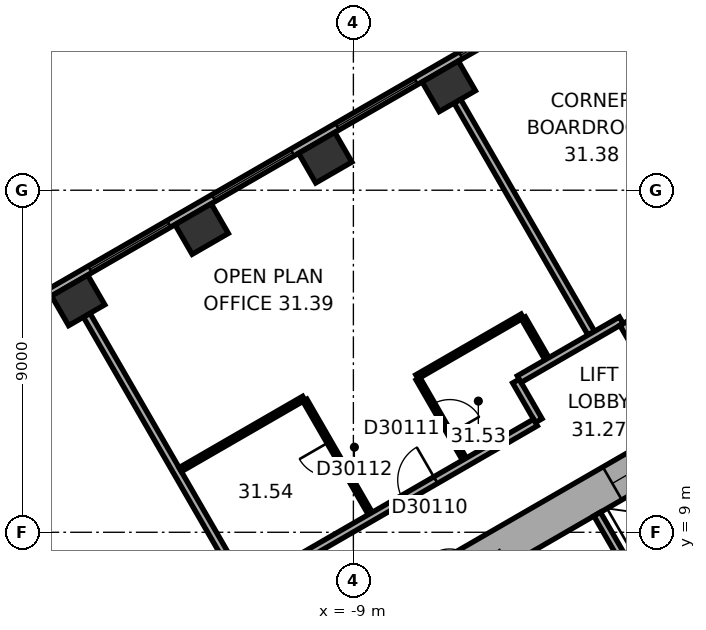
"""IFC4 building model, lengths in metres.
Left out: names, types, materials, properties, quantities, classifications, styles, units other than length and angle.
Written with IfcOpenShell. Run it as: python <this file> out.ifc"""

import sys

from ifc_helpers import new_model, si_unit, direction, frame, frame_2d, origin, origin_2d, place, context, subcontext, project, spatial, rectangle, extrude, element, fill, save


model = new_model("IFC4")
c1 = context("Model", 3, precision=1e-05, world=origin(), true_north=direction((0.0, 1.0)))
c2 = subcontext(c1, "Body", "Model", "MODEL_VIEW")
j1 = project(units=[si_unit("LENGTHUNIT", "METRE"), si_unit("PLANEANGLEUNIT", "RADIAN")], contexts=[c1])
p1 = place(None, origin())
s1 = spatial("IfcSite", under=j1, at=p1, CompositionType="ELEMENT")
p2 = place(p1, origin())
s2 = spatial("IfcBuilding", under=s1, at=p2, CompositionType="ELEMENT")
p3 = place(p2, frame((0.0, 0.0, 128.1)))
s3 = spatial("IfcBuildingStorey", under=s2, at=p3, CompositionType="ELEMENT", Elevation=128.1)
for number, where, z_axis, x_axis in (
    (1, (-6.489, 20.733, 0.0), (0.0, 0.0, 1.0), (-0.866, -0.5, 0.0)),
    (2, (-9.74, 18.856, 0.0), (0.0, 0.0, 1.0), (-0.866, -0.5, 0.0)),
    (3, (-12.991, 16.979, 0.0), (0.0, 0.0, 1.0), (-0.866, -0.5, 0.0)),
    (4, (-16.242, 15.102, 0.0), (0.0, 0.0, 1.0), (-0.866, -0.5, 0.0)),
):
    element("IfcColumn", number, at=place(p3, frame(where, z_axis=z_axis, x_axis=x_axis)), inside=s3, PredefinedType="COLUMN", context=c2, shape_type="SweptSolid", body=[
        extrude(rectangle(XDim=1.1, YDim=0.9, at=origin_2d()), origin(), (0.0, 0.0, 1.0), 3.7),
    ])
p4 = place(p3, frame((0.25, 11.691, 0.0), z_axis=(0.0, 0.0, 1.0), x_axis=(-0.866022616891, -0.50000482701, 0.0)))
e5 = element("IfcWall", 5, at=p4, inside=s3, PredefinedType="SHEAR", context=c2, shape_type="SweptSolid", body=[
    extrude(rectangle(XDim=12.125, YDim=1.0, at=frame_2d((6.062, 0.0))), origin(), (0.0, 0.0, 1.0), 3.7),
])
p5 = place(p4, frame((6.262, 0.0, 0.0)))
e6 = element("IfcOpeningElement", 6, at=p5, cuts=e5, PredefinedType="OPENING", context=c2, shape_type="SweptSolid", body=[
    extrude(rectangle(XDim=1.5, YDim=2.1, at=frame_2d((0.75, 1.05))), frame((0.0, 0.51, 0.0), z_axis=(0.0, -1.0, 0.0), x_axis=(1.0, 0.0, 0.0)), (0.0, 0.0, 1.0), 1.02),
])
p6 = place(p4, frame((1.712, 0.0, 0.0)))
e7 = element("IfcOpeningElement", 7, at=p6, cuts=e5, PredefinedType="OPENING", context=c2, shape_type="SweptSolid", body=[
    extrude(rectangle(XDim=1.1, YDim=2.1, at=frame_2d((0.55, 1.05))), frame((0.0, 0.51, 0.0), z_axis=(0.0, -1.0, 0.0), x_axis=(1.0, 0.0, 0.0)), (0.0, 0.0, 1.0), 1.02),
])
p7 = place(p3, frame((-2.961, 23.405, 0.0), z_axis=(0.0, 0.0, 1.0), x_axis=(-0.866023315909, -0.500003616288, 0.0)))
e8 = element("IfcWall", 8, at=p7, inside=s3, PredefinedType="STANDARD", context=c2, shape_type="SweptSolid", body=[
    extrude(rectangle(XDim=20.044, YDim=0.2, at=frame_2d((10.022, 0.0))), origin(), (0.0, 0.0, 1.0), 3.7),
])
p8 = place(p7, frame((1.314, 0.0, 0.9)))
e9 = element("IfcOpeningElement", 9, at=p8, cuts=e8, PredefinedType="OPENING", context=c2, shape_type="SweptSolid", body=[
    extrude(rectangle(XDim=2.4, YDim=2.0, at=frame_2d((1.2, 1.0))), frame((0.0, 0.11, 0.0), z_axis=(0.0, -1.0, 0.0), x_axis=(1.0, 0.0, 0.0)), (0.0, 0.0, 1.0), 0.22),
])
p9 = place(p7, frame((5.069, 0.0, 0.9)))
e10 = element("IfcOpeningElement", 10, at=p9, cuts=e8, PredefinedType="OPENING", context=c2, shape_type="SweptSolid", body=[
    extrude(rectangle(XDim=2.4, YDim=2.0, at=frame_2d((1.2, 1.0))), frame((0.0, 0.11, 0.0), z_axis=(0.0, -1.0, 0.0), x_axis=(1.0, 0.0, 0.0)), (0.0, 0.0, 1.0), 0.22),
])
p10 = place(p7, frame((8.823, 0.0, 0.9)))
e11 = element("IfcOpeningElement", 11, at=p10, cuts=e8, PredefinedType="OPENING", context=c2, shape_type="SweptSolid", body=[
    extrude(rectangle(XDim=2.4, YDim=2.0, at=frame_2d((1.2, 1.0))), frame((0.0, 0.11, 0.0), z_axis=(0.0, -1.0, 0.0), x_axis=(1.0, 0.0, 0.0)), (0.0, 0.0, 1.0), 0.22),
])
p11 = place(p7, frame((12.577, 0.0, 0.9)))
e12 = element("IfcOpeningElement", 12, at=p11, cuts=e8, PredefinedType="OPENING", context=c2, shape_type="SweptSolid", body=[
    extrude(rectangle(XDim=2.4, YDim=2.0, at=frame_2d((1.2, 1.0))), frame((0.0, 0.11, 0.0), z_axis=(0.0, -1.0, 0.0), x_axis=(1.0, 0.0, 0.0)), (0.0, 0.0, 1.0), 0.22),
])
p12 = place(p7, frame((16.331, 0.0, 0.9)))
e13 = element("IfcOpeningElement", 13, at=p12, cuts=e8, PredefinedType="OPENING", context=c2, shape_type="SweptSolid", body=[
    extrude(rectangle(XDim=2.4, YDim=2.0, at=frame_2d((1.2, 1.0))), frame((0.0, 0.11, 0.0), z_axis=(0.0, -1.0, 0.0), x_axis=(1.0, 0.0, 0.0)), (0.0, 0.0, 1.0), 0.22),
])
p13 = place(p3, frame((0.803, 9.009, 0.0), z_axis=(0.0, 0.0, 1.0), x_axis=(-0.866028230842, -0.499995103361, 0.0)))
e14 = element("IfcWall", 14, at=p13, inside=s3, PredefinedType="PARTITIONING", context=c2, shape_type="SweptSolid", body=[
    extrude(rectangle(XDim=5.4, YDim=0.2, at=frame_2d((2.7, 0.0))), origin(), (0.0, 0.0, 1.0), 3.42),
])
p14 = place(p3, frame((-1.485, 7.572, 0.0), z_axis=(0.0, 0.0, 1.0), x_axis=(-0.50002983664, 0.866008176907, 0.0)))
e15 = element("IfcWall", 15, at=p14, inside=s3, PredefinedType="PARTITIONING", context=c2, shape_type="SweptSolid", body=[
    extrude(rectangle(XDim=2.2, YDim=0.2, at=frame_2d((1.1, 0.0))), origin(), (0.0, 0.0, 1.0), 3.42),
])
p15 = place(p3, frame((-16.018, 14.712, 0.0), z_axis=(0.0, 0.0, 1.0), x_axis=(0.500000843414, -0.866024916838, 0.0)))
e16 = element("IfcWall", 16, at=p15, inside=s3, PredefinedType="PARTITIONING", context=c2, shape_type="SweptSolid", body=[
    extrude(rectangle(XDim=8.452, YDim=0.2, at=frame_2d((4.226, 0.0))), origin(), (0.0, 0.0, 1.0), 3.42),
])
p16 = place(p3, frame((-13.556, 10.649, 0.0), z_axis=(0.0, 0.0, 1.0), x_axis=(0.866020939036, 0.500007733091, 0.0)))
e17 = element("IfcWall", 17, at=p16, inside=s3, PredefinedType="PARTITIONING", context=c2, shape_type="SweptSolid", body=[
    extrude(rectangle(XDim=3.753, YDim=0.12, at=frame_2d((1.877, 0.0))), origin(), (0.0, 0.0, 1.0), 3.42),
])
p17 = place(p3, frame((-10.275, 12.473, 0.0), z_axis=(0.0, 0.0, 1.0), x_axis=(0.500009156386, -0.866020117278, 0.0)))
e18 = element("IfcWall", 18, at=p17, inside=s3, PredefinedType="PARTITIONING", context=c2, shape_type="SweptSolid", body=[
    extrude(rectangle(XDim=3.44, YDim=0.12, at=frame_2d((1.72, 0.0))), origin(), (0.0, 0.0, 1.0), 3.42),
])
p18 = place(p17, frame((1.27, 0.0, 0.0)))
e19 = element("IfcOpeningElement", 19, at=p18, cuts=e18, PredefinedType="OPENING", context=c2, shape_type="SweptSolid", body=[
    extrude(rectangle(XDim=0.9, YDim=2.1, at=frame_2d((0.45, 1.05))), frame((0.0, 0.07, 0.0), z_axis=(0.0, -1.0, 0.0), x_axis=(1.0, 0.0, 0.0)), (0.0, 0.0, 1.0), 0.14),
])
p19 = place(p3, frame((-7.328, 13.09, 0.0), z_axis=(0.0, 0.0, 1.0), x_axis=(0.866008981251, 0.500028443584, 0.0)))
e20 = element("IfcWall", 20, at=p19, inside=s3, PredefinedType="PARTITIONING", context=c2, shape_type="SweptSolid", body=[
    extrude(rectangle(XDim=3.2, YDim=0.12, at=frame_2d((1.6, 0.0))), origin(), (0.0, 0.0, 1.0), 3.42),
])
p20 = place(p3, frame((-6.264, 20.344, 0.0), z_axis=(0.0, 0.0, 1.0), x_axis=(0.500009260695, -0.866020057054, 0.0)))
e21 = element("IfcWall", 21, at=p20, inside=s3, PredefinedType="PARTITIONING", context=c2, shape_type="SweptSolid", body=[
    extrude(rectangle(XDim=7.049, YDim=0.2, at=frame_2d((3.524, 0.0))), origin(), (0.0, 0.0, 1.0), 3.42),
])
p21 = place(p3, frame((-6.078, 10.925, 0.0), z_axis=(0.0, 0.0, 1.0), x_axis=(-0.500002508028, 0.866023955769, 0.0)))
e22 = element("IfcWall", 22, at=p21, inside=s3, PredefinedType="PARTITIONING", context=c2, shape_type="SweptSolid", body=[
    extrude(rectangle(XDim=2.44, YDim=0.12, at=frame_2d((1.22, 0.0))), origin(), (0.0, 0.0, 1.0), 2.87),
])
p22 = place(p21, frame((0.77, 0.0, 0.0)))
e23 = element("IfcOpeningElement", 23, at=p22, cuts=e22, PredefinedType="OPENING", context=c2, shape_type="SweptSolid", body=[
    extrude(rectangle(XDim=0.9, YDim=2.1, at=frame_2d((0.45, 1.05))), frame((0.0, 0.07, 0.0), z_axis=(0.0, -1.0, 0.0), x_axis=(1.0, 0.0, 0.0)), (0.0, 0.0, 1.0), 0.14),
])
p23 = place(p3, frame((-4.723, 12.978, 0.0), z_axis=(0.0, 0.0, 1.0), x_axis=(0.500074377092, -0.865982457891, 0.0)))
e24 = element("IfcWall", 24, at=p23, inside=s3, PredefinedType="PARTITIONING", context=c2, shape_type="SweptSolid", body=[
    extrude(rectangle(XDim=1.201, YDim=0.2, at=frame_2d((0.601, 0.0))), origin(), (0.0, 0.0, 1.0), 3.42),
])
p24 = place(p3, frame((-4.526, 14.638, 0.0), z_axis=(0.0, 0.0, 1.0), x_axis=(0.499932836684, -0.86606417707, 0.0)))
e25 = element("IfcWall", 25, at=p24, inside=s3, PredefinedType="PARTITIONING", context=c2, shape_type="SweptSolid", body=[
    extrude(rectangle(XDim=1.239, YDim=0.12, at=frame_2d((0.62, 0.0))), origin(), (0.0, 0.0, 1.0), 3.42),
])
p25 = place(p3, frame((-4.209, 11.888, 0.0), z_axis=(0.0, 0.0, 1.0), x_axis=(-0.866020930448, -0.500007747966, 0.0)))
e26 = element("IfcWall", 26, at=p25, inside=s3, PredefinedType="PARTITIONING", context=c2, shape_type="SweptSolid", body=[
    extrude(rectangle(XDim=8.321, YDim=0.2, at=frame_2d((4.161, 0.0))), origin(), (0.0, 0.0, 1.0), 3.42),
])
p26 = place(p25, frame((3.031, 0.0, 0.0)))
e27 = element("IfcOpeningElement", 27, at=p26, cuts=e26, PredefinedType="OPENING", context=c2, shape_type="SweptSolid", body=[
    extrude(rectangle(XDim=1.0, YDim=2.1, at=frame_2d((0.5, 1.05))), frame((0.0, 0.11, 0.0), z_axis=(0.0, -1.0, 0.0), x_axis=(1.0, 0.0, 0.0)), (0.0, 0.0, 1.0), 0.22),
])
p27 = place(p3, frame((-1.95, 14.579, 0.0), z_axis=(0.0, 0.0, 1.0), x_axis=(-0.866011260204, -0.500024496599, 0.0)))
e28 = element("IfcWall", 28, at=p27, inside=s3, PredefinedType="PARTITIONING", context=c2, shape_type="SweptSolid", body=[
    extrude(rectangle(XDim=3.102, YDim=0.2, at=frame_2d((1.551, 0.0))), origin(), (0.0, 0.0, 1.0), 3.42),
])
p28 = place(p3, frame((-1.349, 13.539, 0.0), z_axis=(0.0, 0.0, 1.0), x_axis=(-0.500074377092, 0.865982457891, 0.0)))
e29 = element("IfcWall", 29, at=p28, inside=s3, PredefinedType="PARTITIONING", context=c2, shape_type="SweptSolid", body=[
    extrude(rectangle(XDim=1.101, YDim=0.2, at=frame_2d((0.55, 0.0))), origin(), (0.0, 0.0, 1.0), 3.42),
])
p29 = place(p8, origin())
e30 = element("IfcWindow", 30, at=p29, inside=s3, PartitioningType="SINGLE_PANEL", PredefinedType="WINDOW", context=c2, shape_type="SweptSolid", body=[
    extrude(rectangle(XDim=2.4, YDim=2.0, at=frame_2d((1.2, 1.0))), frame((0.0, 0.03, 0.0), z_axis=(0.0, -1.0, 0.0), x_axis=(1.0, 0.0, 0.0)), (0.0, 0.0, 1.0), 0.06),
])
fill(e9, e30)
p30 = place(p9, origin())
e31 = element("IfcWindow", 31, at=p30, inside=s3, PartitioningType="SINGLE_PANEL", PredefinedType="WINDOW", context=c2, shape_type="SweptSolid", body=[
    extrude(rectangle(XDim=2.4, YDim=2.0, at=frame_2d((1.2, 1.0))), frame((0.0, 0.03, 0.0), z_axis=(0.0, -1.0, 0.0), x_axis=(1.0, 0.0, 0.0)), (0.0, 0.0, 1.0), 0.06),
])
fill(e10, e31)
p31 = place(p10, origin())
e32 = element("IfcWindow", 32, at=p31, inside=s3, PartitioningType="SINGLE_PANEL", PredefinedType="WINDOW", context=c2, shape_type="SweptSolid", body=[
    extrude(rectangle(XDim=2.4, YDim=2.0, at=frame_2d((1.2, 1.0))), frame((0.0, 0.03, 0.0), z_axis=(0.0, -1.0, 0.0), x_axis=(1.0, 0.0, 0.0)), (0.0, 0.0, 1.0), 0.06),
])
fill(e11, e32)
p32 = place(p11, origin())
e33 = element("IfcWindow", 33, at=p32, inside=s3, PartitioningType="SINGLE_PANEL", PredefinedType="WINDOW", context=c2, shape_type="SweptSolid", body=[
    extrude(rectangle(XDim=2.4, YDim=2.0, at=frame_2d((1.2, 1.0))), frame((0.0, 0.03, 0.0), z_axis=(0.0, -1.0, 0.0), x_axis=(1.0, 0.0, 0.0)), (0.0, 0.0, 1.0), 0.06),
])
fill(e12, e33)
p33 = place(p5, origin())
e34 = element("IfcDoor", 34, at=p33, inside=s3, OperationType="DOUBLE_DOOR_SINGLE_SWING", PredefinedType="DOOR", context=c2, shape_type="SweptSolid", body=[
    extrude(rectangle(XDim=1.5, YDim=2.1, at=frame_2d((0.75, 1.05))), frame((0.0, 0.025, 0.0), z_axis=(0.0, -1.0, 0.0), x_axis=(1.0, 0.0, 0.0)), (0.0, 0.0, 1.0), 0.05),
])
fill(e6, e34)
p34 = place(p6, origin())
e35 = element("IfcDoor", 35, at=p34, inside=s3, OperationType="DOUBLE_DOOR_SLIDING", PredefinedType="DOOR", context=c2, shape_type="SweptSolid", body=[
    extrude(rectangle(XDim=1.1, YDim=2.1, at=frame_2d((0.55, 1.05))), frame((0.0, 0.025, 0.0), z_axis=(0.0, -1.0, 0.0), x_axis=(1.0, 0.0, 0.0)), (0.0, 0.0, 1.0), 0.05),
])
fill(e7, e35)
p35 = place(p26, origin())
e36 = element("IfcDoor", 36, at=p35, inside=s3, OperationType="SINGLE_SWING_LEFT", PredefinedType="DOOR", context=c2, shape_type="SweptSolid", body=[
    extrude(rectangle(XDim=1.0, YDim=2.1, at=frame_2d((0.5, 1.05))), frame((0.0, 0.025, 0.0), z_axis=(0.0, -1.0, 0.0), x_axis=(1.0, 0.0, 0.0)), (0.0, 0.0, 1.0), 0.05),
])
fill(e27, e36)
p36 = place(p22, origin())
e37 = element("IfcDoor", 37, at=p36, inside=s3, OperationType="SINGLE_SWING_LEFT", PredefinedType="DOOR", context=c2, shape_type="SweptSolid", body=[
    extrude(rectangle(XDim=0.9, YDim=2.1, at=frame_2d((0.45, 1.05))), frame((0.0, 0.025, 0.0), z_axis=(0.0, -1.0, 0.0), x_axis=(1.0, 0.0, 0.0)), (0.0, 0.0, 1.0), 0.05),
])
fill(e23, e37)
p37 = place(p18, origin())
e38 = element("IfcDoor", 38, at=p37, inside=s3, OperationType="SINGLE_SWING_LEFT", PredefinedType="DOOR", context=c2, shape_type="SweptSolid", body=[
    extrude(rectangle(XDim=0.9, YDim=2.1, at=frame_2d((0.45, 1.05))), frame((0.0, 0.025, 0.0), z_axis=(0.0, -1.0, 0.0), x_axis=(1.0, 0.0, 0.0)), (0.0, 0.0, 1.0), 0.05),
])
fill(e19, e38)
save(model, sys.argv[1])
